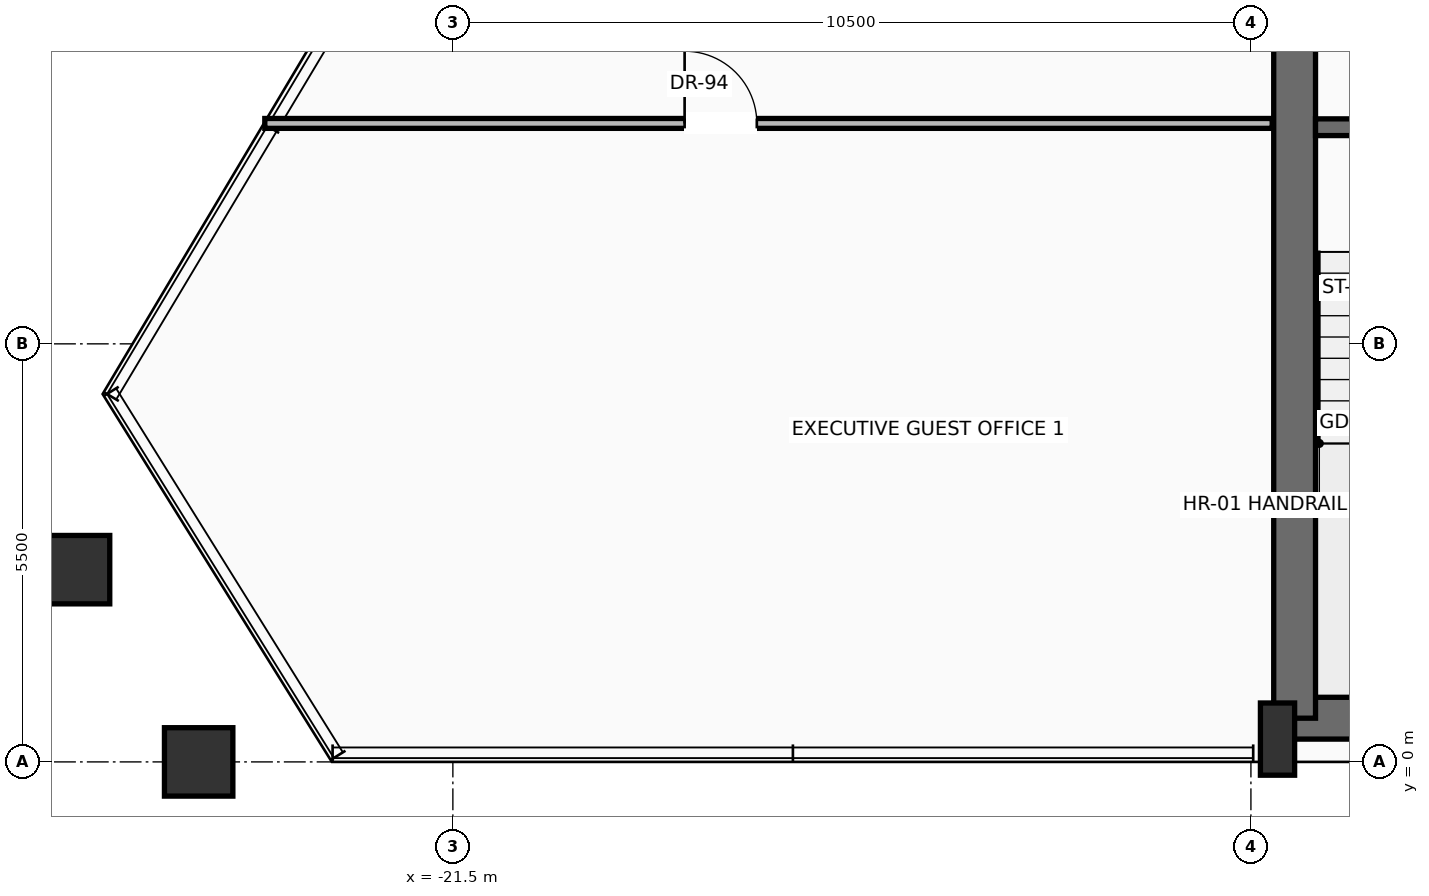
"""IFC4 building model, lengths in metres.
Left out: names, types, materials, properties, quantities, classifications, styles, units other than length and angle.
Written with IfcOpenShell. Run it as: python <this file> out.ifc"""

import sys

from ifc_helpers import new_model, si_unit, direction, frame, frame_2d, origin, origin_2d, place, context, subcontext, project, spatial, rectangle, hollow_rectangle, extrude, source, transform, mapped, element, fill, save


model = new_model("IFC4")
c1 = context("Model", 3, precision=1e-05, world=origin(), true_north=direction((0.0, 1.0)))
c2 = subcontext(c1, "Body", "Model", "MODEL_VIEW")
j1 = project(units=[si_unit("LENGTHUNIT", "METRE"), si_unit("PLANEANGLEUNIT", "RADIAN")], contexts=[c1])
p1 = place(None, origin())
s1 = spatial("IfcSite", under=j1, at=p1, CompositionType="ELEMENT")
p2 = place(p1, origin())
s2 = spatial("IfcBuilding", under=s1, at=p2, CompositionType="ELEMENT")
p3 = place(p2, frame((0.0, 0.0, 226.9)))
s3 = spatial("IfcBuildingStorey", under=s2, at=p3, CompositionType="ELEMENT", Elevation=226.9)
p4 = place(p3, frame((-10.65, 0.575, 0.0), z_axis=(0.0, 0.0, 1.0), x_axis=(1.0, 0.0, 0.0)))
e1 = element("IfcWall", 1, at=p4, inside=s3, PredefinedType="SHEAR", context=c2, shape_type="SweptSolid", body=[
    extrude(rectangle(XDim=21.3, YDim=0.55, at=frame_2d((10.65, 0.0))), origin(), (0.0, 0.0, 1.0), 3.24),
])
p5 = place(p3, frame((-10.425, 0.575, 0.0), z_axis=(0.0, 0.0, 1.0), x_axis=(0.0, 1.0, 0.0)))
e2 = element("IfcWall", 2, at=p5, inside=s3, PredefinedType="SHEAR", context=c2, shape_type="SweptSolid", body=[
    extrude(rectangle(XDim=15.45, YDim=0.55, at=frame_2d((7.725, 0.0))), origin(), (0.0, 0.0, 1.0), 3.24),
])
m1 = source(origin(), c2, "Body", "SweptSolid", [
    extrude(rectangle(XDim=0.45, YDim=0.95, at=origin_2d()), origin(), (0.0, 0.0, 1.0), 3.45),
])
p6 = place(p3, frame((-10.65, 0.3, 0.0), z_axis=(0.0, 0.0, 1.0), x_axis=(1.0, 0.0, 0.0)))
e3 = element("IfcColumn", 3, at=p6, inside=s3, PredefinedType="PILASTER", context=c2, shape_type="MappedRepresentation", body=[
    mapped(m1, transform((0.0, 0.0, 0.0), scale=1.0)),
])
m2 = source(origin(), c2, "Body", "SweptSolid", [
    extrude(hollow_rectangle(XDim=0.9, YDim=0.9, WallThickness=0.045, at=origin_2d()), origin(), (0.0, 0.0, 1.0), 3.441),
])
p7 = place(p3, frame((-24.845, 0.0, 0.004), z_axis=(-0.004327428266, 0.0, 0.999990636638), x_axis=(0.0, -1.0, 0.0)))
e4 = element("IfcColumn", 4, at=p7, inside=s3, PredefinedType="COLUMN", context=c2, shape_type="MappedRepresentation", body=[
    mapped(m2, transform((0.0, 0.0, 0.0), scale=1.0)),
])
m3 = source(origin(), c2, "Body", "SweptSolid", [
    extrude(hollow_rectangle(XDim=0.9, YDim=0.9, WallThickness=0.045, at=origin_2d()), origin(), (0.0, 0.0, 1.0), 3.442),
])
p8 = place(p3, frame((-26.464, 2.529, 0.004), z_axis=(0.007873111875, -0.01759037608, 0.999814279143), x_axis=(0.912746030738, 0.408527457306, 0.0)))
e5 = element("IfcColumn", 5, at=p8, inside=s3, PredefinedType="COLUMN", context=c2, shape_type="MappedRepresentation", body=[
    mapped(m3, transform((0.0, 0.0, 0.0), scale=1.0)),
])
p9 = place(p3, frame((-5.5, 8.35, 0.0), z_axis=(0.0, 0.0, 1.0), x_axis=(-1.0, 0.0, 0.0)))
e6 = element("IfcWall", 6, at=p9, inside=s3, PredefinedType="SOLIDWALL", context=c2, shape_type="SweptSolid", body=[
    extrude(rectangle(XDim=4.65, YDim=0.22, at=frame_2d((2.325, 0.0))), origin(), (0.0, 0.0, 1.0), 3.24),
])
p10 = place(p9, frame((2.5, 0.0, 0.0)))
e7 = element("IfcOpeningElement", 7, at=p10, cuts=e6, PredefinedType="OPENING", context=c2, shape_type="SweptSolid", body=[
    extrude(rectangle(XDim=1.15, YDim=2.2, at=frame_2d((0.575, 1.1))), frame((0.0, 0.12, 0.0), z_axis=(0.0, -1.0, 0.0), x_axis=(1.0, 0.0, 0.0)), (0.0, 0.0, 1.0), 0.24),
])
p11 = place(p3, frame((-23.974, 8.4, 0.0), z_axis=(0.0, 0.0, 1.0), x_axis=(1.0, 0.0, 0.0)))
e8 = element("IfcWall", 8, at=p11, inside=s3, PredefinedType="PARTITIONING", context=c2, shape_type="SweptSolid", body=[
    extrude(rectangle(XDim=13.254, YDim=0.13, at=frame_2d((6.627, 0.0))), origin(), (0.0, 0.0, 1.0), 3.232),
])
p12 = place(p11, frame((5.523, 0.0, 0.0)))
e9 = element("IfcOpeningElement", 9, at=p12, cuts=e8, PredefinedType="OPENING", context=c2, shape_type="SweptSolid", body=[
    extrude(rectangle(XDim=0.95, YDim=2.2, at=frame_2d((0.475, 1.1))), frame((0.0, 0.075, 0.0), z_axis=(0.0, -1.0, 0.0), x_axis=(1.0, 0.0, 0.0)), (0.0, 0.0, 1.0), 0.15),
])
m4 = source(origin(), c2, "Body", "SweptSolid", [
    extrude(rectangle(XDim=0.95, YDim=2.2, at=frame_2d((0.475, 1.1))), frame((0.0, 0.025, 0.0), z_axis=(0.0, -1.0, 0.0), x_axis=(1.0, 0.0, 0.0)), (0.0, 0.0, 1.0), 0.05),
])
p13 = place(p12, origin())
e10 = element("IfcDoor", 10, at=p13, inside=s3, OperationType="SINGLE_SWING_LEFT", PredefinedType="DOOR", context=c2, shape_type="MappedRepresentation", body=[
    mapped(m4, transform((0.0, 0.0, 0.0), scale=1.0)),
])
fill(e9, e10)
save(model, sys.argv[1])
